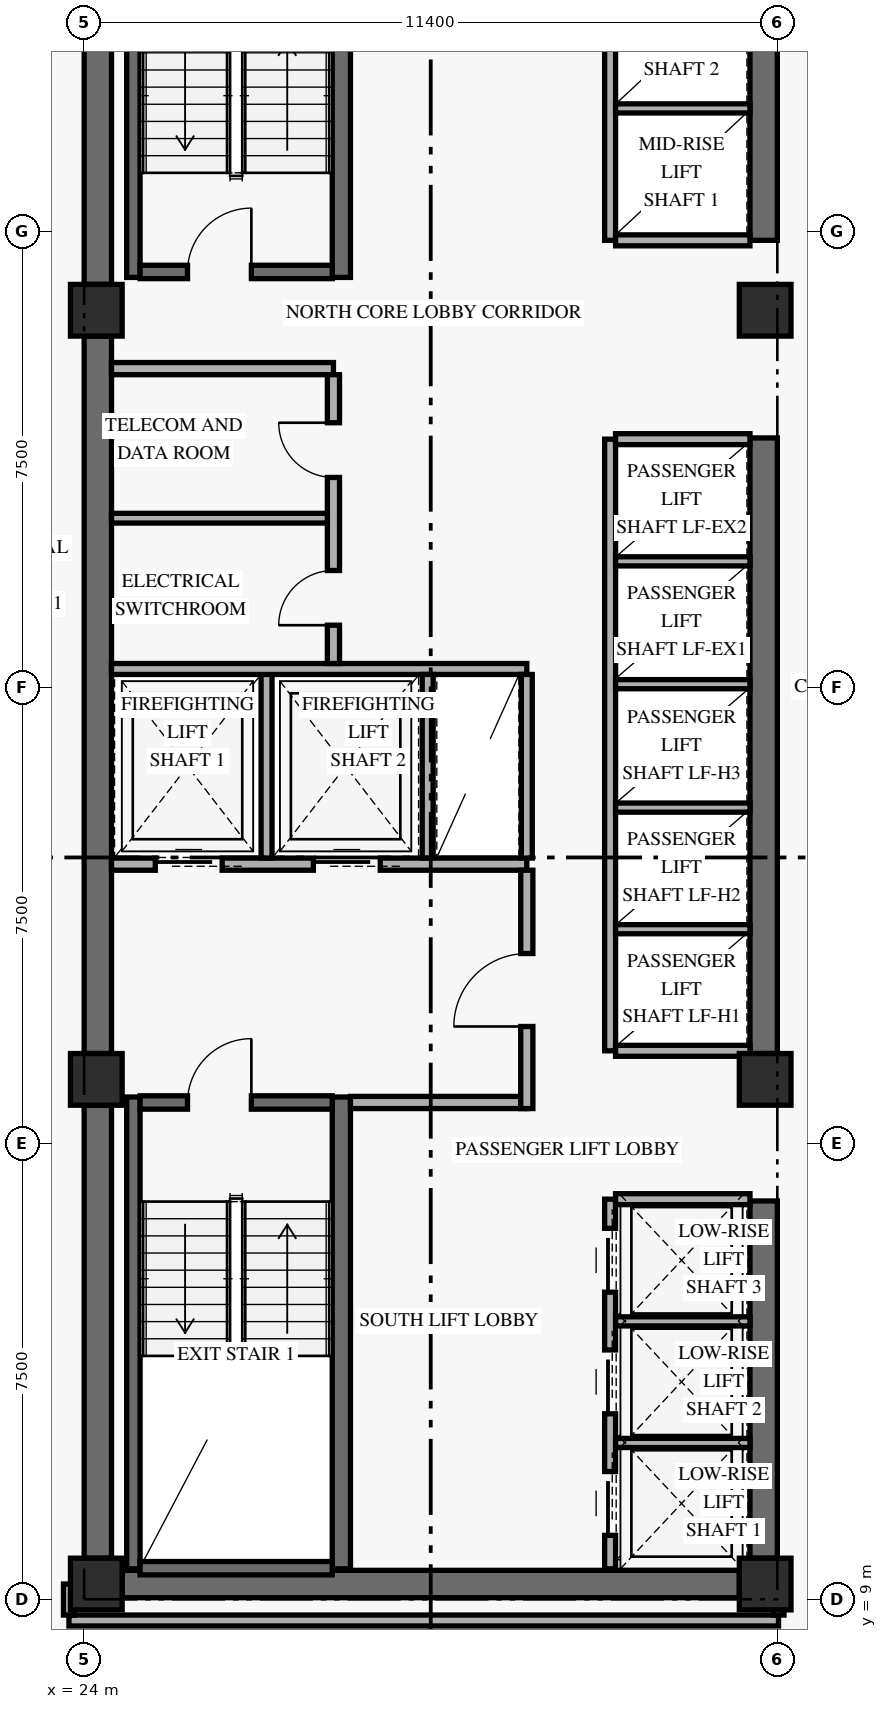
"""IFC4 building model, lengths in metres.
Left out: names, types, materials, properties, quantities, classifications, styles, units other than length and angle.
Written with IfcOpenShell. Run it as: python <this file> out.ifc"""

import sys

from ifc_helpers import new_model, si_unit, direction, frame, frame_2d, origin, origin_2d, place, context, subcontext, project, spatial, rectangle, extrude, element, fill, save


model = new_model("IFC4")
c1 = context("Model", 3, precision=1e-05, world=origin(), true_north=direction((0.0, 1.0)))
c2 = subcontext(c1, "Body", "Model", "MODEL_VIEW")
j1 = project(units=[si_unit("LENGTHUNIT", "METRE"), si_unit("PLANEANGLEUNIT", "RADIAN")], contexts=[c1])
p1 = place(None, origin())
s1 = spatial("IfcSite", under=j1, at=p1, CompositionType="ELEMENT")
p2 = place(p1, origin())
s2 = spatial("IfcBuilding", under=s1, at=p2, CompositionType="ELEMENT")
p3 = place(p2, frame((0.0, 0.0, 76.8)))
s3 = spatial("IfcBuildingStorey", under=s2, at=p3, CompositionType="ELEMENT", Elevation=76.8)
p4 = place(p3, frame((24.225, 9.675, 0.0), z_axis=(0.0, 0.0, 1.0), x_axis=(0.0, 1.0, 0.0)))
e1 = element("IfcWall", 1, at=p4, inside=s3, PredefinedType="SHEAR", context=c2, shape_type="SweptSolid", body=[
    extrude(rectangle(XDim=7.45, YDim=0.45, at=frame_2d((3.725, 0.0))), origin(), (0.0, 0.0, 1.0), 2.749),
])
p5 = place(p3, frame((24.225, 17.975, 0.0), z_axis=(0.0, 0.0, 1.0), x_axis=(0.0, 1.0, 0.0)))
e2 = element("IfcWall", 2, at=p5, inside=s3, PredefinedType="SHEAR", context=c2, shape_type="SweptSolid", body=[
    extrude(rectangle(XDim=11.8, YDim=0.45, at=frame_2d((5.9, 0.0))), origin(), (0.0, 0.0, 1.0), 2.749),
])
p6 = place(p3, frame((24.225, 30.625, 0.0), z_axis=(0.0, 0.0, 1.0), x_axis=(0.0, 1.0, 0.0)))
e3 = element("IfcWall", 3, at=p6, inside=s3, PredefinedType="SHEAR", context=c2, shape_type="SweptSolid", body=[
    extrude(rectangle(XDim=7.7, YDim=0.45, at=frame_2d((3.85, 0.0))), origin(), (0.0, 0.0, 1.0), 2.749),
])
p7 = place(p3, frame((35.175, 9.675, 0.0), z_axis=(0.0, 0.0, 1.0), x_axis=(0.0, 1.0, 0.0)))
e4 = element("IfcWall", 4, at=p7, inside=s3, PredefinedType="SHEAR", context=c2, shape_type="SweptSolid", body=[
    extrude(rectangle(XDim=5.875, YDim=0.45, at=frame_2d((2.938, 0.0))), origin(), (0.0, 0.0, 1.0), 2.749),
])
p8 = place(p3, frame((35.175, 17.975, 0.0), z_axis=(0.0, 0.0, 1.0), x_axis=(0.0, 1.0, 0.0)))
e5 = element("IfcWall", 5, at=p8, inside=s3, PredefinedType="SHEAR", context=c2, shape_type="SweptSolid", body=[
    extrude(rectangle(XDim=10.125, YDim=0.45, at=frame_2d((5.062, 0.0))), origin(), (0.0, 0.0, 1.0), 2.749),
])
p9 = place(p3, frame((35.175, 31.35, 0.0), z_axis=(0.0, 0.0, 1.0), x_axis=(0.0, 1.0, 0.0)))
e6 = element("IfcWall", 6, at=p9, inside=s3, PredefinedType="SHEAR", context=c2, shape_type="SweptSolid", body=[
    extrude(rectangle(XDim=6.975, YDim=0.45, at=frame_2d((3.487, 0.0))), origin(), (0.0, 0.0, 1.0), 2.749),
])
p10 = place(p3, frame((24.625, 9.25, 0.0), z_axis=(0.0, 0.0, 1.0), x_axis=(1.0, 0.0, 0.0)))
e7 = element("IfcWall", 7, at=p10, inside=s3, PredefinedType="SHEAR", context=c2, shape_type="SweptSolid", body=[
    extrude(rectangle(XDim=10.15, YDim=0.45, at=frame_2d((5.075, 0.0))), origin(), (0.0, 0.0, 1.0), 3.36),
])
p11 = place(p3, frame((24.81, 9.5, 0.0), z_axis=(0.0, 0.0, 1.0), x_axis=(0.0, 1.0, 0.0)))
e8 = element("IfcWall", 8, at=p11, inside=s3, PredefinedType="SHEAR", context=c2, shape_type="SweptSolid", body=[
    extrude(rectangle(XDim=7.76, YDim=0.22, at=frame_2d((3.88, 0.0))), origin(), (0.0, 0.0, 1.0), 3.36),
])
p12 = place(p3, frame((28.23, 9.5, 0.0), z_axis=(0.0, 0.0, 1.0), x_axis=(0.0, 1.0, 0.0)))
e9 = element("IfcWall", 9, at=p12, inside=s3, PredefinedType="SHEAR", context=c2, shape_type="SweptSolid", body=[
    extrude(rectangle(XDim=7.76, YDim=0.3, at=frame_2d((3.88, 0.0))), origin(), (0.0, 0.0, 1.0), 3.36),
])
p13 = place(p3, frame((24.92, 9.51, 0.0), z_axis=(0.0, 0.0, 1.0), x_axis=(1.0, 0.0, 0.0)))
e10 = element("IfcWall", 10, at=p13, inside=s3, PredefinedType="SHEAR", context=c2, shape_type="SweptSolid", body=[
    extrude(rectangle(XDim=3.16, YDim=0.22, at=frame_2d((1.58, 0.0))), origin(), (0.0, 0.0, 1.0), 3.36),
])
p14 = place(p3, frame((24.92, 17.17, 0.0), z_axis=(0.0, 0.0, 1.0), x_axis=(1.0, 0.0, 0.0)))
e11 = element("IfcWall", 11, at=p14, inside=s3, PredefinedType="SHEAR", context=c2, shape_type="SweptSolid", body=[
    extrude(rectangle(XDim=3.16, YDim=0.22, at=frame_2d((1.58, 0.0))), origin(), (0.0, 0.0, 1.0), 3.36),
])
p15 = place(p14, frame((0.78, 0.0, 0.0)))
e12 = element("IfcOpeningElement", 12, at=p15, cuts=e11, PredefinedType="OPENING", context=c2, shape_type="SweptSolid", body=[
    extrude(rectangle(XDim=1.05, YDim=2.15, at=frame_2d((0.525, 1.075))), frame((0.0, 0.12, 0.0), z_axis=(0.0, -1.0, 0.0), x_axis=(1.0, 0.0, 0.0)), (0.0, 0.0, 1.0), 0.24),
])
p16 = place(p3, frame((24.81, 30.74, 0.0), z_axis=(0.0, 0.0, 1.0), x_axis=(0.0, 1.0, 0.0)))
e13 = element("IfcWall", 13, at=p16, inside=s3, PredefinedType="SHEAR", context=c2, shape_type="SweptSolid", body=[
    extrude(rectangle(XDim=7.76, YDim=0.22, at=frame_2d((3.88, 0.0))), origin(), (0.0, 0.0, 1.0), 3.36),
])
p17 = place(p3, frame((28.23, 30.74, 0.0), z_axis=(0.0, 0.0, 1.0), x_axis=(0.0, 1.0, 0.0)))
e14 = element("IfcWall", 14, at=p17, inside=s3, PredefinedType="SHEAR", context=c2, shape_type="SweptSolid", body=[
    extrude(rectangle(XDim=7.76, YDim=0.3, at=frame_2d((3.88, 0.0))), origin(), (0.0, 0.0, 1.0), 3.36),
])
p18 = place(p3, frame((24.92, 30.83, 0.0), z_axis=(0.0, 0.0, 1.0), x_axis=(1.0, 0.0, 0.0)))
e15 = element("IfcWall", 15, at=p18, inside=s3, PredefinedType="SHEAR", context=c2, shape_type="SweptSolid", body=[
    extrude(rectangle(XDim=3.16, YDim=0.22, at=frame_2d((1.58, 0.0))), origin(), (0.0, 0.0, 1.0), 3.36),
])
p19 = place(p18, frame((0.78, 0.0, 0.0)))
e16 = element("IfcOpeningElement", 16, at=p19, cuts=e15, PredefinedType="OPENING", context=c2, shape_type="SweptSolid", body=[
    extrude(rectangle(XDim=1.05, YDim=2.15, at=frame_2d((0.525, 1.075))), frame((0.0, 0.12, 0.0), z_axis=(0.0, -1.0, 0.0), x_axis=(1.0, 0.0, 0.0)), (0.0, 0.0, 1.0), 0.24),
])
for number, where, z_axis, x_axis in (
    (17, (24.2, 9.25, 0.0), (0.0, 0.0, 1.0), (1.0, 0.0, 0.0)),
    (18, (24.2, 17.55, 0.0), (0.0, 0.0, 1.0), (1.0, 0.0, 0.0)),
    (19, (24.2, 30.2, 0.0), (0.0, 0.0, 1.0), (1.0, 0.0, 0.0)),
    (20, (35.2, 9.25, 0.0), (0.0, 0.0, 1.0), (1.0, 0.0, 0.0)),
    (21, (35.2, 17.55, 0.0), (0.0, 0.0, 1.0), (1.0, 0.0, 0.0)),
    (22, (35.2, 30.2, 0.0), (0.0, 0.0, 1.0), (1.0, 0.0, 0.0)),
):
    element("IfcColumn", number, at=place(p3, frame(where, z_axis=z_axis, x_axis=x_axis)), inside=s3, PredefinedType="COLUMN", context=c2, shape_type="SweptSolid", body=[
        extrude(rectangle(XDim=0.85, YDim=0.85, at=origin_2d()), origin(), (0.0, 0.0, 1.0), 3.6),
    ])
p20 = place(p3, frame((24.45, 21.09, 0.0), z_axis=(0.0, 0.0, 1.0), x_axis=(1.0, 0.0, 0.0)))
e23 = element("IfcWall", 23, at=p20, inside=s3, PredefinedType="STANDARD", context=c2, shape_type="SweptSolid", body=[
    extrude(rectangle(XDim=6.83, YDim=0.2, at=frame_2d((3.415, 0.0))), origin(), (0.0, 0.0, 1.0), 3.36),
])
p21 = place(p20, frame((0.72, 0.0, 0.0)))
e24 = element("IfcOpeningElement", 24, at=p21, cuts=e23, PredefinedType="OPENING", context=c2, shape_type="SweptSolid", body=[
    extrude(rectangle(XDim=1.1, YDim=2.2, at=frame_2d((0.55, 1.1))), frame((0.0, 0.11, 0.0), z_axis=(0.0, -1.0, 0.0), x_axis=(1.0, 0.0, 0.0)), (0.0, 0.0, 1.0), 0.22),
])
p22 = place(p20, frame((3.32, 0.0, 0.0)))
e25 = element("IfcOpeningElement", 25, at=p22, cuts=e23, PredefinedType="OPENING", context=c2, shape_type="SweptSolid", body=[
    extrude(rectangle(XDim=1.1, YDim=2.2, at=frame_2d((0.55, 1.1))), frame((0.0, 0.11, 0.0), z_axis=(0.0, -1.0, 0.0), x_axis=(1.0, 0.0, 0.0)), (0.0, 0.0, 1.0), 0.22),
])
p23 = place(p3, frame((28.38, 17.17, 0.0), z_axis=(0.0, 0.0, 1.0), x_axis=(1.0, 0.0, 0.0)))
e26 = element("IfcWall", 26, at=p23, inside=s3, PredefinedType="STANDARD", context=c2, shape_type="SweptSolid", body=[
    extrude(rectangle(XDim=2.9, YDim=0.2, at=frame_2d((1.45, 0.0))), origin(), (0.0, 0.0, 1.0), 3.36),
])
p24 = place(p3, frame((31.28, 17.07, 0.0), z_axis=(0.0, 0.0, 1.0), x_axis=(0.0, 1.0, 0.0)))
e27 = element("IfcWall", 27, at=p24, inside=s3, PredefinedType="STANDARD", context=c2, shape_type="SweptSolid", body=[
    extrude(rectangle(XDim=3.92, YDim=0.2, at=frame_2d((1.96, 0.0))), origin(), (0.0, 0.0, 1.0), 2.731),
])
p25 = place(p24, frame((1.35, 0.0, 0.0)))
e28 = element("IfcOpeningElement", 28, at=p25, cuts=e27, PredefinedType="OPENING", context=c2, shape_type="SweptSolid", body=[
    extrude(rectangle(XDim=1.2, YDim=2.15, at=frame_2d((0.6, 1.075))), frame((0.0, 0.11, 0.0), z_axis=(0.0, -1.0, 0.0), x_axis=(1.0, 0.0, 0.0)), (0.0, 0.0, 1.0), 0.22),
])
p26 = place(p3, frame((27.0, 21.19, 0.0), z_axis=(0.0, 0.0, 1.0), x_axis=(0.0, 1.0, 0.0)))
e29 = element("IfcWall", 29, at=p26, inside=s3, PredefinedType="STANDARD", context=c2, shape_type="SweptSolid", body=[
    extrude(rectangle(XDim=3.11, YDim=0.18, at=frame_2d((1.555, 0.0))), origin(), (0.0, 0.0, 1.0), 3.36),
])
p27 = place(p3, frame((24.45, 24.3, 0.0), z_axis=(0.0, 0.0, 1.0), x_axis=(1.0, 0.0, 0.0)))
e30 = element("IfcWall", 30, at=p27, inside=s3, PredefinedType="STANDARD", context=c2, shape_type="SweptSolid", body=[
    extrude(rectangle(XDim=6.83, YDim=0.18, at=frame_2d((3.415, 0.0))), origin(), (0.0, 0.0, 1.0), 3.36),
])
for number, where, z_axis, x_axis in (
    (31, (29.65, 21.19, 0.0), (0.0, 0.0, 1.0), (0.0, 1.0, 0.0)),
    (32, (31.28, 21.19, 0.0), (0.0, 0.0, 1.0), (0.0, 1.0, 0.0)),
):
    element("IfcWall", number, at=place(p3, frame(where, z_axis=z_axis, x_axis=x_axis)), inside=s3, PredefinedType="STANDARD", context=c2, shape_type="SweptSolid", body=[
        extrude(rectangle(XDim=3.02, YDim=0.18, at=frame_2d((1.51, 0.0))), origin(), (0.0, 0.0, 1.0), 3.36),
    ])
p28 = place(p3, frame((24.45, 29.24, 0.0), z_axis=(0.0, 0.0, 1.0), x_axis=(1.0, 0.0, 0.0)))
e33 = element("IfcWall", 33, at=p28, inside=s3, PredefinedType="STANDARD", context=c2, shape_type="SweptSolid", body=[
    extrude(rectangle(XDim=3.65, YDim=0.2, at=frame_2d((1.825, 0.0))), origin(), (0.0, 0.0, 1.0), 3.36),
])
p29 = place(p3, frame((28.1, 24.39, 0.0), z_axis=(0.0, 0.0, 1.0), x_axis=(0.0, 1.0, 0.0)))
e34 = element("IfcWall", 34, at=p29, inside=s3, PredefinedType="STANDARD", context=c2, shape_type="SweptSolid", body=[
    extrude(rectangle(XDim=4.75, YDim=0.2, at=frame_2d((2.375, 0.0))), origin(), (0.0, 0.0, 1.0), 3.36),
])
p30 = place(p29, frame((0.63, 0.0, 0.0)))
e35 = element("IfcOpeningElement", 35, at=p30, cuts=e34, PredefinedType="OPENING", context=c2, shape_type="SweptSolid", body=[
    extrude(rectangle(XDim=0.9, YDim=2.1, at=frame_2d((0.45, 1.05))), frame((0.0, 0.11, 0.0), z_axis=(0.0, -1.0, 0.0), x_axis=(1.0, 0.0, 0.0)), (0.0, 0.0, 1.0), 0.22),
])
p31 = place(p29, frame((3.06, 0.0, 0.0)))
e36 = element("IfcOpeningElement", 36, at=p31, cuts=e34, PredefinedType="OPENING", context=c2, shape_type="SweptSolid", body=[
    extrude(rectangle(XDim=0.9, YDim=2.1, at=frame_2d((0.45, 1.05))), frame((0.0, 0.11, 0.0), z_axis=(0.0, -1.0, 0.0), x_axis=(1.0, 0.0, 0.0)), (0.0, 0.0, 1.0), 0.22),
])
p32 = place(p3, frame((24.45, 26.78, 0.0), z_axis=(0.0, 0.0, 1.0), x_axis=(1.0, 0.0, 0.0)))
e37 = element("IfcWall", 37, at=p32, inside=s3, PredefinedType="PARTITIONING", context=c2, shape_type="SweptSolid", body=[
    extrude(rectangle(XDim=3.55, YDim=0.16, at=frame_2d((1.775, 0.0))), origin(), (0.0, 0.0, 1.0), 3.36),
])
p33 = place(p3, frame((32.65, 9.5, 0.0), z_axis=(0.0, 0.0, 1.0), x_axis=(0.0, 1.0, 0.0)))
e38 = element("IfcWall", 38, at=p33, inside=s3, PredefinedType="STANDARD", context=c2, shape_type="SweptSolid", body=[
    extrude(rectangle(XDim=6.08, YDim=0.18, at=frame_2d((3.04, 0.0))), origin(), (0.0, 0.0, 1.0), 3.36),
])
p34 = place(p33, frame((0.55, 0.0, 0.0)))
e39 = element("IfcOpeningElement", 39, at=p34, cuts=e38, PredefinedType="OPENING", context=c2, shape_type="SweptSolid", body=[
    extrude(rectangle(XDim=1.05, YDim=2.2, at=frame_2d((0.525, 1.1))), frame((0.0, 0.1, 0.0), z_axis=(0.0, -1.0, 0.0), x_axis=(1.0, 0.0, 0.0)), (0.0, 0.0, 1.0), 0.2),
])
p35 = place(p33, frame((2.55, 0.0, 0.0)))
e40 = element("IfcOpeningElement", 40, at=p35, cuts=e38, PredefinedType="OPENING", context=c2, shape_type="SweptSolid", body=[
    extrude(rectangle(XDim=1.05, YDim=2.2, at=frame_2d((0.525, 1.1))), frame((0.0, 0.1, 0.0), z_axis=(0.0, -1.0, 0.0), x_axis=(1.0, 0.0, 0.0)), (0.0, 0.0, 1.0), 0.2),
])
p36 = place(p33, frame((4.55, 0.0, 0.0)))
e41 = element("IfcOpeningElement", 41, at=p36, cuts=e38, PredefinedType="OPENING", context=c2, shape_type="SweptSolid", body=[
    extrude(rectangle(XDim=1.05, YDim=2.2, at=frame_2d((0.525, 1.1))), frame((0.0, 0.1, 0.0), z_axis=(0.0, -1.0, 0.0), x_axis=(1.0, 0.0, 0.0)), (0.0, 0.0, 1.0), 0.2),
])
p37 = place(p3, frame((32.74, 15.58, 0.0), z_axis=(0.0, 0.0, 1.0), x_axis=(1.0, 0.0, 0.0)))
e42 = element("IfcWall", 42, at=p37, inside=s3, PredefinedType="STANDARD", context=c2, shape_type="SweptSolid", body=[
    extrude(rectangle(XDim=2.21, YDim=0.18, at=frame_2d((1.105, 0.0))), origin(), (0.0, 0.0, 1.0), 3.36),
])
for number, where, z_axis, x_axis in (
    (43, (32.74, 11.57, 0.0), (0.0, 0.0, 1.0), (1.0, 0.0, 0.0)),
    (44, (32.74, 13.57, 0.0), (0.0, 0.0, 1.0), (1.0, 0.0, 0.0)),
):
    element("IfcWall", number, at=place(p3, frame(where, z_axis=z_axis, x_axis=x_axis)), inside=s3, PredefinedType="STANDARD", context=c2, shape_type="SweptSolid", body=[
        extrude(rectangle(XDim=2.21, YDim=0.15, at=frame_2d((1.105, 0.0))), origin(), (0.0, 0.0, 1.0), 3.36),
    ])
p38 = place(p3, frame((32.65, 18.02, 0.0), z_axis=(0.0, 0.0, 1.0), x_axis=(0.0, 1.0, 0.0)))
e45 = element("IfcWall", 45, at=p38, inside=s3, PredefinedType="STANDARD", context=c2, shape_type="SweptSolid", body=[
    extrude(rectangle(XDim=10.06, YDim=0.18, at=frame_2d((5.03, 0.0))), origin(), (0.0, 0.0, 1.0), 3.36),
])
for number, where, z_axis, x_axis in (
    (46, (32.74, 18.02, 0.0), (0.0, 0.0, 1.0), (1.0, 0.0, 0.0)),
    (47, (32.74, 28.08, 0.0), (0.0, 0.0, 1.0), (1.0, 0.0, 0.0)),
):
    element("IfcWall", number, at=place(p3, frame(where, z_axis=z_axis, x_axis=x_axis)), inside=s3, PredefinedType="STANDARD", context=c2, shape_type="SweptSolid", body=[
        extrude(rectangle(XDim=2.21, YDim=0.18, at=frame_2d((1.105, 0.0))), origin(), (0.0, 0.0, 1.0), 3.36),
    ])
for number, where, z_axis, x_axis in (
    (48, (32.74, 20.02, 0.0), (0.0, 0.0, 1.0), (1.0, 0.0, 0.0)),
    (49, (32.74, 22.02, 0.0), (0.0, 0.0, 1.0), (1.0, 0.0, 0.0)),
    (50, (32.74, 24.05, 0.0), (0.0, 0.0, 1.0), (1.0, 0.0, 0.0)),
    (51, (32.74, 26.07, 0.0), (0.0, 0.0, 1.0), (1.0, 0.0, 0.0)),
):
    element("IfcWall", number, at=place(p3, frame(where, z_axis=z_axis, x_axis=x_axis)), inside=s3, PredefinedType="STANDARD", context=c2, shape_type="SweptSolid", body=[
        extrude(rectangle(XDim=2.21, YDim=0.15, at=frame_2d((1.105, 0.0))), origin(), (0.0, 0.0, 1.0), 3.36),
    ])
p39 = place(p3, frame((32.65, 31.35, 0.0), z_axis=(0.0, 0.0, 1.0), x_axis=(0.0, 1.0, 0.0)))
e52 = element("IfcWall", 52, at=p39, inside=s3, PredefinedType="STANDARD", context=c2, shape_type="SweptSolid", body=[
    extrude(rectangle(XDim=7.175, YDim=0.18, at=frame_2d((3.587, 0.0))), origin(), (0.0, 0.0, 1.0), 3.36),
])
p40 = place(p3, frame((32.74, 31.35, 0.0), z_axis=(0.0, 0.0, 1.0), x_axis=(1.0, 0.0, 0.0)))
e53 = element("IfcWall", 53, at=p40, inside=s3, PredefinedType="STANDARD", context=c2, shape_type="SweptSolid", body=[
    extrude(rectangle(XDim=2.21, YDim=0.18, at=frame_2d((1.105, 0.0))), origin(), (0.0, 0.0, 1.0), 3.36),
])
p41 = place(p3, frame((32.74, 33.52, 0.0), z_axis=(0.0, 0.0, 1.0), x_axis=(1.0, 0.0, 0.0)))
e54 = element("IfcWall", 54, at=p41, inside=s3, PredefinedType="STANDARD", context=c2, shape_type="SweptSolid", body=[
    extrude(rectangle(XDim=2.21, YDim=0.15, at=frame_2d((1.105, 0.0))), origin(), (0.0, 0.0, 1.0), 3.36),
])
p42 = place(p3, frame((23.75, 8.65, 0.0), z_axis=(0.0, 0.0, 1.0), x_axis=(1.0, 0.0, 0.0)))
e55 = element("IfcWall", 55, at=p42, inside=s3, PredefinedType="STANDARD", context=c2, shape_type="SweptSolid", body=[
    extrude(rectangle(XDim=11.67, YDim=0.18, at=frame_2d((5.835, 0.0))), origin(), (0.0, 0.0, 1.0), 2.731),
])
for number, where, z_axis, x_axis in (
    (56, (35.42, 8.74, 0.0), (0.0, 0.0, 1.0), (0.0, 1.0, 0.0)),
    (57, (23.75, 8.74, 0.0), (0.0, 0.0, 1.0), (0.0, 1.0, 0.0)),
):
    element("IfcWall", number, at=place(p3, frame(where, z_axis=z_axis, x_axis=x_axis)), inside=s3, PredefinedType="STANDARD", context=c2, shape_type="SweptSolid", body=[
        extrude(rectangle(XDim=0.51, YDim=0.18, at=frame_2d((0.255, 0.0))), origin(), (0.0, 0.0, 1.0), 2.731),
    ])
p43 = place(p15, frame((1.05, 0.0, 0.0), z_axis=(0.0, 0.0, 1.0), x_axis=(-1.0, 0.0, 0.0)))
e58 = element("IfcDoor", 58, at=p43, inside=s3, OperationType="SINGLE_SWING_LEFT", PredefinedType="DOOR", context=c2, shape_type="SweptSolid", body=[
    extrude(rectangle(XDim=1.05, YDim=2.15, at=frame_2d((0.525, 1.075))), frame((0.0, 0.025, 0.0), z_axis=(0.0, -1.0, 0.0), x_axis=(1.0, 0.0, 0.0)), (0.0, 0.0, 1.0), 0.05),
])
fill(e12, e58)
p44 = place(p19, origin())
e59 = element("IfcDoor", 59, at=p44, inside=s3, OperationType="SINGLE_SWING_RIGHT", PredefinedType="DOOR", context=c2, shape_type="SweptSolid", body=[
    extrude(rectangle(XDim=1.05, YDim=2.15, at=frame_2d((0.525, 1.075))), frame((0.0, 0.025, 0.0), z_axis=(0.0, -1.0, 0.0), x_axis=(1.0, 0.0, 0.0)), (0.0, 0.0, 1.0), 0.05),
])
fill(e16, e59)
p45 = place(p21, origin())
e60 = element("IfcDoor", 60, at=p45, inside=s3, OperationType="SLIDING_TO_LEFT", PredefinedType="DOOR", context=c2, shape_type="SweptSolid", body=[
    extrude(rectangle(XDim=1.1, YDim=2.2, at=frame_2d((0.55, 1.1))), frame((0.0, 0.025, 0.0), z_axis=(0.0, -1.0, 0.0), x_axis=(1.0, 0.0, 0.0)), (0.0, 0.0, 1.0), 0.05),
])
fill(e24, e60)
p46 = place(p22, origin())
e61 = element("IfcDoor", 61, at=p46, inside=s3, OperationType="SLIDING_TO_LEFT", PredefinedType="DOOR", context=c2, shape_type="SweptSolid", body=[
    extrude(rectangle(XDim=1.1, YDim=2.2, at=frame_2d((0.55, 1.1))), frame((0.0, 0.025, 0.0), z_axis=(0.0, -1.0, 0.0), x_axis=(1.0, 0.0, 0.0)), (0.0, 0.0, 1.0), 0.05),
])
fill(e25, e61)
p47 = place(p25, origin())
e62 = element("IfcDoor", 62, at=p47, inside=s3, OperationType="SINGLE_SWING_LEFT", PredefinedType="DOOR", context=c2, shape_type="SweptSolid", body=[
    extrude(rectangle(XDim=1.2, YDim=2.15, at=frame_2d((0.6, 1.075))), frame((0.0, 0.025, 0.0), z_axis=(0.0, -1.0, 0.0), x_axis=(1.0, 0.0, 0.0)), (0.0, 0.0, 1.0), 0.05),
])
fill(e28, e62)
p48 = place(p30, origin())
e63 = element("IfcDoor", 63, at=p48, inside=s3, OperationType="SINGLE_SWING_LEFT", PredefinedType="DOOR", context=c2, shape_type="SweptSolid", body=[
    extrude(rectangle(XDim=0.9, YDim=2.1, at=frame_2d((0.45, 1.05))), frame((0.0, 0.025, 0.0), z_axis=(0.0, -1.0, 0.0), x_axis=(1.0, 0.0, 0.0)), (0.0, 0.0, 1.0), 0.05),
])
fill(e35, e63)
p49 = place(p31, origin())
e64 = element("IfcDoor", 64, at=p49, inside=s3, OperationType="SINGLE_SWING_RIGHT", PredefinedType="DOOR", context=c2, shape_type="SweptSolid", body=[
    extrude(rectangle(XDim=0.9, YDim=2.1, at=frame_2d((0.45, 1.05))), frame((0.0, 0.025, 0.0), z_axis=(0.0, -1.0, 0.0), x_axis=(1.0, 0.0, 0.0)), (0.0, 0.0, 1.0), 0.05),
])
fill(e36, e64)
p50 = place(p34, origin())
e65 = element("IfcDoor", 65, at=p50, inside=s3, OperationType="SLIDING_TO_LEFT", PredefinedType="DOOR", context=c2, shape_type="SweptSolid", body=[
    extrude(rectangle(XDim=1.05, YDim=2.2, at=frame_2d((0.525, 1.1))), frame((0.0, 0.025, 0.0), z_axis=(0.0, -1.0, 0.0), x_axis=(1.0, 0.0, 0.0)), (0.0, 0.0, 1.0), 0.05),
])
fill(e39, e65)
p51 = place(p35, origin())
e66 = element("IfcDoor", 66, at=p51, inside=s3, OperationType="SLIDING_TO_LEFT", PredefinedType="DOOR", context=c2, shape_type="SweptSolid", body=[
    extrude(rectangle(XDim=1.05, YDim=2.2, at=frame_2d((0.525, 1.1))), frame((0.0, 0.025, 0.0), z_axis=(0.0, -1.0, 0.0), x_axis=(1.0, 0.0, 0.0)), (0.0, 0.0, 1.0), 0.05),
])
fill(e40, e66)
p52 = place(p36, origin())
e67 = element("IfcDoor", 67, at=p52, inside=s3, OperationType="SLIDING_TO_LEFT", PredefinedType="DOOR", context=c2, shape_type="SweptSolid", body=[
    extrude(rectangle(XDim=1.05, YDim=2.2, at=frame_2d((0.525, 1.1))), frame((0.0, 0.025, 0.0), z_axis=(0.0, -1.0, 0.0), x_axis=(1.0, 0.0, 0.0)), (0.0, 0.0, 1.0), 0.05),
])
fill(e41, e67)
save(model, sys.argv[1])
